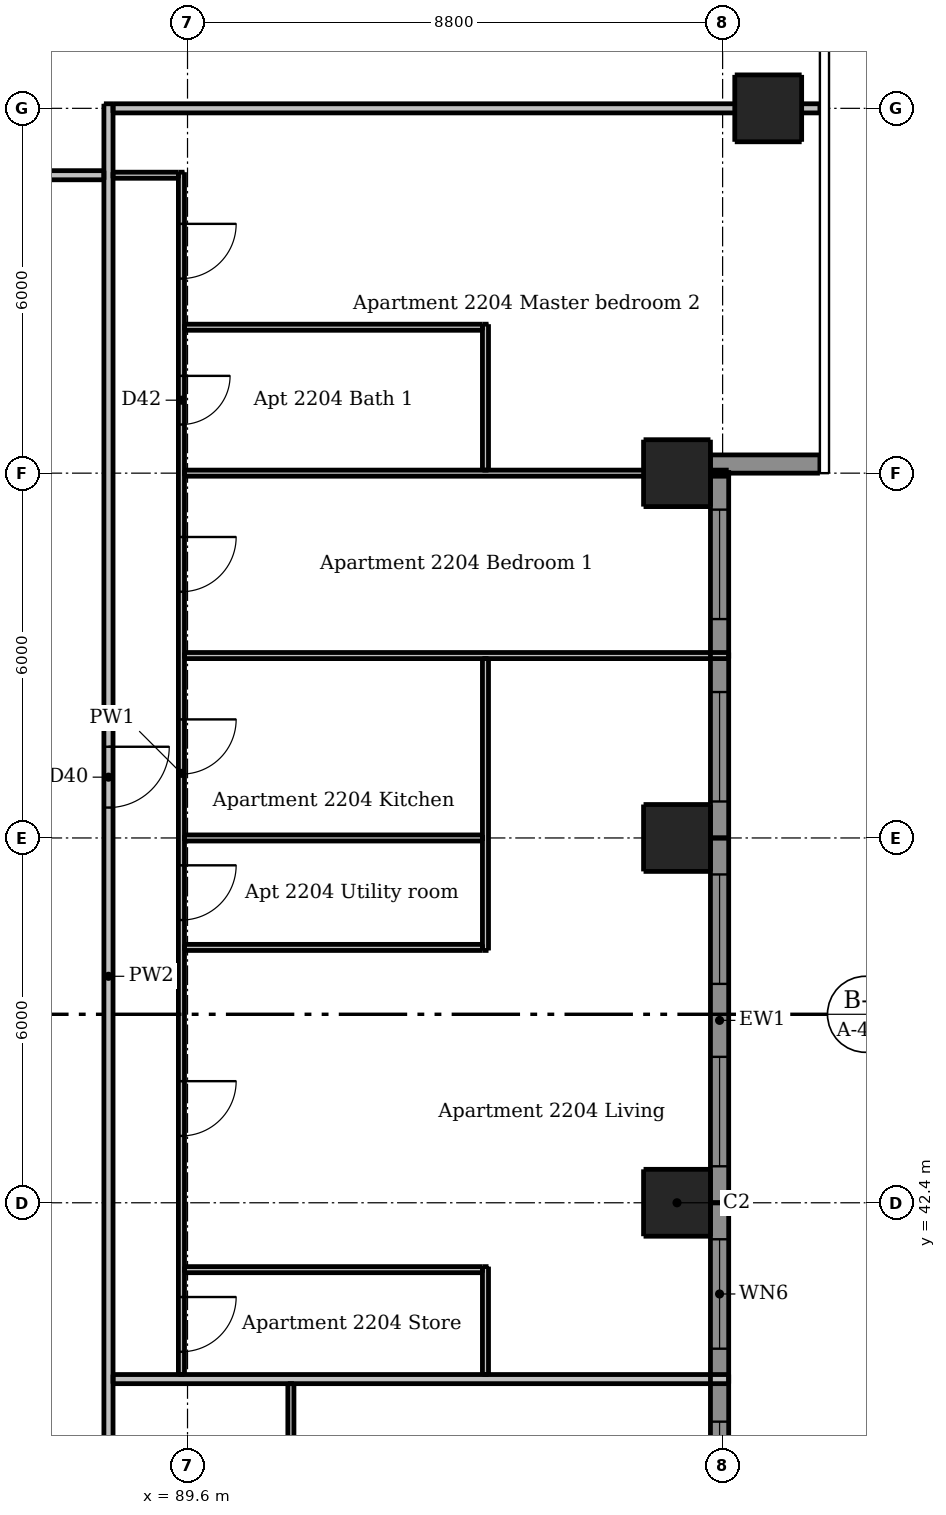
"""IFC4 building model, lengths in metres.
Left out: names, types, materials, properties, quantities, classifications, styles, units other than length and angle.
Written with IfcOpenShell. Run it as: python <this file> out.ifc"""

import sys

from ifc_helpers import new_model, si_unit, direction, frame, frame_2d, origin, origin_2d, place, context, subcontext, project, spatial, rectangle, extrude, element, fill, save


model = new_model("IFC4")
c1 = context("Model", 3, precision=1e-05, world=origin(), true_north=direction((0.0, 1.0)))
c2 = subcontext(c1, "Body", "Model", "MODEL_VIEW")
j1 = project(units=[si_unit("LENGTHUNIT", "METRE"), si_unit("PLANEANGLEUNIT", "RADIAN")], contexts=[c1])
p1 = place(None, origin())
s1 = spatial("IfcSite", under=j1, at=p1, CompositionType="ELEMENT")
p2 = place(p1, origin())
s2 = spatial("IfcBuilding", under=s1, at=p2, CompositionType="ELEMENT")
p3 = place(p2, frame((0.0, 0.0, 85.3)))
s3 = spatial("IfcBuildingStorey", under=s2, at=p3, CompositionType="ELEMENT", Elevation=85.3)
for number, where, z_axis, x_axis in (
    (1, (97.65, 42.4, 0.0), (0.0, 0.0, 1.0), (1.0, 0.0, 0.0)),
    (2, (97.65, 48.4, 0.0), (0.0, 0.0, 1.0), (1.0, 0.0, 0.0)),
    (3, (97.65, 54.4, 0.0), (0.0, 0.0, 1.0), (1.0, 0.0, 0.0)),
    (4, (99.15, 60.4, 0.0), (0.0, 0.0, 1.0), (1.0, 0.0, 0.0)),
):
    element("IfcColumn", number, at=place(p3, frame(where, z_axis=z_axis, x_axis=x_axis)), inside=s3, PredefinedType="COLUMN", context=c2, shape_type="SweptSolid", body=[
        extrude(rectangle(XDim=1.1, YDim=1.1, at=origin_2d()), origin(), (0.0, 0.0, 1.0), 3.05),
    ])
p4 = place(p3, frame((98.2, 54.55, 0.0), z_axis=(0.0, 0.0, 1.0), x_axis=(1.0, 0.0, 0.0)))
e5 = element("IfcWall", 5, at=p4, inside=s3, PredefinedType="SOLIDWALL", context=c2, shape_type="SweptSolid", body=[
    extrude(rectangle(XDim=1.8, YDim=0.3, at=frame_2d((0.9, 0.0))), origin(), (0.0, 0.0, 1.0), 3.05),
])
p5 = place(p3, frame((98.35, 36.7, 0.0), z_axis=(0.0, 0.0, 1.0), x_axis=(0.0, 1.0, 0.0)))
e6 = element("IfcWall", 6, at=p5, inside=s3, PredefinedType="SOLIDWALL", context=c2, shape_type="SweptSolid", body=[
    extrude(rectangle(XDim=5.7, YDim=0.3, at=frame_2d((2.85, 0.0))), origin(), (0.0, 0.0, 1.0), 3.05),
])
p6 = place(p5, frame((0.3, 0.0, 0.15)))
e7 = element("IfcOpeningElement", 7, at=p6, cuts=e6, PredefinedType="OPENING", context=c2, shape_type="SweptSolid", body=[
    extrude(rectangle(XDim=1.8, YDim=2.1, at=frame_2d((0.9, 1.05))), frame((0.0, 0.16, 0.0), z_axis=(0.0, -1.0, 0.0), x_axis=(1.0, 0.0, 0.0)), (0.0, 0.0, 1.0), 0.32),
])
p7 = place(p5, frame((3.3, 0.0, 0.15)))
e8 = element("IfcOpeningElement", 8, at=p7, cuts=e6, PredefinedType="OPENING", context=c2, shape_type="SweptSolid", body=[
    extrude(rectangle(XDim=1.8, YDim=2.1, at=frame_2d((0.9, 1.05))), frame((0.0, 0.16, 0.0), z_axis=(0.0, -1.0, 0.0), x_axis=(1.0, 0.0, 0.0)), (0.0, 0.0, 1.0), 0.32),
])
p8 = place(p3, frame((98.35, 42.4, 0.0), z_axis=(0.0, 0.0, 1.0), x_axis=(0.0, 1.0, 0.0)))
e9 = element("IfcWall", 9, at=p8, inside=s3, PredefinedType="SOLIDWALL", context=c2, shape_type="SweptSolid", body=[
    extrude(rectangle(XDim=6.0, YDim=0.3, at=frame_2d((3.0, 0.0))), origin(), (0.0, 0.0, 1.0), 3.05),
])
p9 = place(p8, frame((0.6, 0.0, 0.15)))
e10 = element("IfcOpeningElement", 10, at=p9, cuts=e9, PredefinedType="OPENING", context=c2, shape_type="SweptSolid", body=[
    extrude(rectangle(XDim=1.8, YDim=2.1, at=frame_2d((0.9, 1.05))), frame((0.0, 0.16, 0.0), z_axis=(0.0, -1.0, 0.0), x_axis=(1.0, 0.0, 0.0)), (0.0, 0.0, 1.0), 0.32),
])
p10 = place(p8, frame((3.6, 0.0, 0.15)))
e11 = element("IfcOpeningElement", 11, at=p10, cuts=e9, PredefinedType="OPENING", context=c2, shape_type="SweptSolid", body=[
    extrude(rectangle(XDim=1.8, YDim=2.1, at=frame_2d((0.9, 1.05))), frame((0.0, 0.16, 0.0), z_axis=(0.0, -1.0, 0.0), x_axis=(1.0, 0.0, 0.0)), (0.0, 0.0, 1.0), 0.32),
])
p11 = place(p3, frame((98.35, 48.4, 0.0), z_axis=(0.0, 0.0, 1.0), x_axis=(0.0, 1.0, 0.0)))
e12 = element("IfcWall", 12, at=p11, inside=s3, PredefinedType="SOLIDWALL", context=c2, shape_type="SweptSolid", body=[
    extrude(rectangle(XDim=6.0, YDim=0.3, at=frame_2d((3.0, 0.0))), origin(), (0.0, 0.0, 1.0), 3.05),
])
p12 = place(p11, frame((0.6, 0.0, 0.15)))
e13 = element("IfcOpeningElement", 13, at=p12, cuts=e12, PredefinedType="OPENING", context=c2, shape_type="SweptSolid", body=[
    extrude(rectangle(XDim=1.8, YDim=2.1, at=frame_2d((0.9, 1.05))), frame((0.0, 0.16, 0.0), z_axis=(0.0, -1.0, 0.0), x_axis=(1.0, 0.0, 0.0)), (0.0, 0.0, 1.0), 0.32),
])
p13 = place(p11, frame((3.6, 0.0, 0.15)))
e14 = element("IfcOpeningElement", 14, at=p13, cuts=e12, PredefinedType="OPENING", context=c2, shape_type="SweptSolid", body=[
    extrude(rectangle(XDim=1.8, YDim=2.1, at=frame_2d((0.9, 1.05))), frame((0.0, 0.16, 0.0), z_axis=(0.0, -1.0, 0.0), x_axis=(1.0, 0.0, 0.0)), (0.0, 0.0, 1.0), 0.32),
])
p14 = place(p3, frame((89.5, 59.35, 0.0), z_axis=(0.0, 0.0, 1.0), x_axis=(0.0, -1.0, 0.0)))
e15 = element("IfcWall", 15, at=p14, inside=s3, PredefinedType="PARTITIONING", context=c2, shape_type="SweptSolid", body=[
    extrude(rectangle(XDim=19.775, YDim=0.1, at=frame_2d((9.888, 0.0))), origin(), (0.0, 0.0, 1.0), 2.51),
])
p15 = place(p14, frame((14.95, 0.0, 0.0)))
e16 = element("IfcOpeningElement", 16, at=p15, cuts=e15, PredefinedType="OPENING", context=c2, shape_type="SweptSolid", body=[
    extrude(rectangle(XDim=0.9, YDim=2.1, at=frame_2d((0.45, 1.05))), frame((0.0, 0.06, 0.0), z_axis=(0.0, -1.0, 0.0), x_axis=(1.0, 0.0, 0.0)), (0.0, 0.0, 1.0), 0.12),
])
p16 = place(p14, frame((9.0, 0.0, 0.0)))
e17 = element("IfcOpeningElement", 17, at=p16, cuts=e15, PredefinedType="OPENING", context=c2, shape_type="SweptSolid", body=[
    extrude(rectangle(XDim=0.9, YDim=2.1, at=frame_2d((0.45, 1.05))), frame((0.0, 0.06, 0.0), z_axis=(0.0, -1.0, 0.0), x_axis=(1.0, 0.0, 0.0)), (0.0, 0.0, 1.0), 0.12),
])
p17 = place(p14, frame((11.4, 0.0, 0.0)))
e18 = element("IfcOpeningElement", 18, at=p17, cuts=e15, PredefinedType="OPENING", context=c2, shape_type="SweptSolid", body=[
    extrude(rectangle(XDim=0.9, YDim=2.1, at=frame_2d((0.45, 1.05))), frame((0.0, 0.06, 0.0), z_axis=(0.0, -1.0, 0.0), x_axis=(1.0, 0.0, 0.0)), (0.0, 0.0, 1.0), 0.12),
])
p18 = place(p14, frame((18.5, 0.0, 0.0)))
e19 = element("IfcOpeningElement", 19, at=p18, cuts=e15, PredefinedType="OPENING", context=c2, shape_type="SweptSolid", body=[
    extrude(rectangle(XDim=0.9, YDim=2.1, at=frame_2d((0.45, 1.05))), frame((0.0, 0.06, 0.0), z_axis=(0.0, -1.0, 0.0), x_axis=(1.0, 0.0, 0.0)), (0.0, 0.0, 1.0), 0.12),
])
p19 = place(p14, frame((6.0, 0.0, 0.0)))
e20 = element("IfcOpeningElement", 20, at=p19, cuts=e15, PredefinedType="OPENING", context=c2, shape_type="SweptSolid", body=[
    extrude(rectangle(XDim=0.9, YDim=2.1, at=frame_2d((0.45, 1.05))), frame((0.0, 0.06, 0.0), z_axis=(0.0, -1.0, 0.0), x_axis=(1.0, 0.0, 0.0)), (0.0, 0.0, 1.0), 0.12),
])
p20 = place(p14, frame((0.85, 0.0, 0.0)))
e21 = element("IfcOpeningElement", 21, at=p20, cuts=e15, PredefinedType="OPENING", context=c2, shape_type="SweptSolid", body=[
    extrude(rectangle(XDim=0.9, YDim=2.1, at=frame_2d((0.45, 1.05))), frame((0.0, 0.06, 0.0), z_axis=(0.0, -1.0, 0.0), x_axis=(1.0, 0.0, 0.0)), (0.0, 0.0, 1.0), 0.12),
])
p21 = place(p14, frame((3.35, 0.0, 0.0)))
e22 = element("IfcOpeningElement", 22, at=p21, cuts=e15, PredefinedType="OPENING", context=c2, shape_type="SweptSolid", body=[
    extrude(rectangle(XDim=0.8, YDim=2.1, at=frame_2d((0.4, 1.05))), frame((0.0, 0.06, 0.0), z_axis=(0.0, -1.0, 0.0), x_axis=(1.0, 0.0, 0.0)), (0.0, 0.0, 1.0), 0.12),
])
p22 = place(p3, frame((91.3, 33.45, 0.0), z_axis=(0.0, 0.0, 1.0), x_axis=(0.0, 1.0, 0.0)))
e23 = element("IfcWall", 23, at=p22, inside=s3, PredefinedType="PARTITIONING", context=c2, shape_type="SweptSolid", body=[
    extrude(rectangle(XDim=5.975, YDim=0.1, at=frame_2d((2.988, 0.0))), origin(), (0.0, 0.0, 1.0), 3.05),
])
p23 = place(p22, frame((3.8, 0.0, 0.0)))
e24 = element("IfcOpeningElement", 24, at=p23, cuts=e23, PredefinedType="OPENING", context=c2, shape_type="SweptSolid", body=[
    extrude(rectangle(XDim=0.8, YDim=2.1, at=frame_2d((0.4, 1.05))), frame((0.0, 0.06, 0.0), z_axis=(0.0, -1.0, 0.0), x_axis=(1.0, 0.0, 0.0)), (0.0, 0.0, 1.0), 0.12),
])
p24 = place(p3, frame((94.5, 39.575, 0.0), z_axis=(0.0, 0.0, 1.0), x_axis=(0.0, 1.0, 0.0)))
e25 = element("IfcWall", 25, at=p24, inside=s3, PredefinedType="PARTITIONING", context=c2, shape_type="SweptSolid", body=[
    extrude(rectangle(XDim=1.775, YDim=0.1, at=frame_2d((0.888, 0.0))), origin(), (0.0, 0.0, 1.0), 3.05),
])
p25 = place(p3, frame((94.5, 46.55, 0.0), z_axis=(0.0, 0.0, 1.0), x_axis=(0.0, 1.0, 0.0)))
e26 = element("IfcWall", 26, at=p25, inside=s3, PredefinedType="PARTITIONING", context=c2, shape_type="SweptSolid", body=[
    extrude(rectangle(XDim=4.8, YDim=0.1, at=frame_2d((2.4, 0.0))), origin(), (0.0, 0.0, 1.0), 3.05),
])
p26 = place(p3, frame((94.5, 54.45, 0.0), z_axis=(0.0, 0.0, 1.0), x_axis=(0.0, 1.0, 0.0)))
e27 = element("IfcWall", 27, at=p26, inside=s3, PredefinedType="PARTITIONING", context=c2, shape_type="SweptSolid", body=[
    extrude(rectangle(XDim=2.4, YDim=0.1, at=frame_2d((1.2, 0.0))), origin(), (0.0, 0.0, 1.0), 3.05),
])
p27 = place(p3, frame((88.375, 59.3, 0.0), z_axis=(0.0, 0.0, 1.0), x_axis=(1.0, 0.0, 0.0)))
e28 = element("IfcWall", 28, at=p27, inside=s3, PredefinedType="PARTITIONING", context=c2, shape_type="SweptSolid", body=[
    extrude(rectangle(XDim=1.075, YDim=0.1, at=frame_2d((0.538, 0.0))), origin(), (0.0, 0.0, 1.0), 3.05),
])
p28 = place(p3, frame((89.55, 56.8, 0.0), z_axis=(0.0, 0.0, 1.0), x_axis=(1.0, 0.0, 0.0)))
e29 = element("IfcWall", 29, at=p28, inside=s3, PredefinedType="PARTITIONING", context=c2, shape_type="SweptSolid", body=[
    extrude(rectangle(XDim=4.9, YDim=0.1, at=frame_2d((2.45, 0.0))), origin(), (0.0, 0.0, 1.0), 3.05),
])
p29 = place(p3, frame((89.55, 54.4, 0.0), z_axis=(0.0, 0.0, 1.0), x_axis=(1.0, 0.0, 0.0)))
e30 = element("IfcWall", 30, at=p29, inside=s3, PredefinedType="PARTITIONING", context=c2, shape_type="SweptSolid", body=[
    extrude(rectangle(XDim=8.95, YDim=0.1, at=frame_2d((4.475, 0.0))), origin(), (0.0, 0.0, 1.0), 2.516),
])
p30 = place(p3, frame((89.55, 51.4, 0.0), z_axis=(0.0, 0.0, 1.0), x_axis=(1.0, 0.0, 0.0)))
e31 = element("IfcWall", 31, at=p30, inside=s3, PredefinedType="PARTITIONING", context=c2, shape_type="SweptSolid", body=[
    extrude(rectangle(XDim=8.95, YDim=0.1, at=frame_2d((4.475, 0.0))), origin(), (0.0, 0.0, 1.0), 3.05),
])
p31 = place(p3, frame((89.55, 48.4, 0.0), z_axis=(0.0, 0.0, 1.0), x_axis=(1.0, 0.0, 0.0)))
e32 = element("IfcWall", 32, at=p31, inside=s3, PredefinedType="PARTITIONING", context=c2, shape_type="SweptSolid", body=[
    extrude(rectangle(XDim=4.9, YDim=0.1, at=frame_2d((2.45, 0.0))), origin(), (0.0, 0.0, 1.0), 2.516),
])
for number, where, z_axis, x_axis in (
    (33, (89.55, 46.6, 0.0), (0.0, 0.0, 1.0), (1.0, 0.0, 0.0)),
    (34, (89.55, 41.3, 0.0), (0.0, 0.0, 1.0), (1.0, 0.0, 0.0)),
):
    element("IfcWall", number, at=place(p3, frame(where, z_axis=z_axis, x_axis=x_axis)), inside=s3, PredefinedType="PARTITIONING", context=c2, shape_type="SweptSolid", body=[
        extrude(rectangle(XDim=4.9, YDim=0.1, at=frame_2d((2.45, 0.0))), origin(), (0.0, 0.0, 1.0), 3.05),
    ])
p32 = place(p3, frame((88.3, 60.475, 0.0), z_axis=(0.0, 0.0, 1.0), x_axis=(0.0, -1.0, 0.0)))
e35 = element("IfcWall", 35, at=p32, inside=s3, PredefinedType="PARTITIONING", context=c2, shape_type="SweptSolid", body=[
    extrude(rectangle(XDim=28.7, YDim=0.15, at=frame_2d((14.35, 0.0))), origin(), (0.0, 0.0, 1.0), 3.05),
])
p33 = place(p32, frame((27.425, 0.0, 0.0)))
e36 = element("IfcOpeningElement", 36, at=p33, cuts=e35, PredefinedType="OPENING", context=c2, shape_type="SweptSolid", body=[
    extrude(rectangle(XDim=1.0, YDim=2.1, at=frame_2d((0.5, 1.05))), frame((0.0, 0.085, 0.0), z_axis=(0.0, -1.0, 0.0), x_axis=(1.0, 0.0, 0.0)), (0.0, 0.0, 1.0), 0.17),
])
p34 = place(p32, frame((10.575, 0.0, 0.0)))
e37 = element("IfcOpeningElement", 37, at=p34, cuts=e35, PredefinedType="OPENING", context=c2, shape_type="SweptSolid", body=[
    extrude(rectangle(XDim=1.0, YDim=2.1, at=frame_2d((0.5, 1.05))), frame((0.0, 0.085, 0.0), z_axis=(0.0, -1.0, 0.0), x_axis=(1.0, 0.0, 0.0)), (0.0, 0.0, 1.0), 0.17),
])
p35 = place(p3, frame((88.375, 60.4, 0.0), z_axis=(0.0, 0.0, 1.0), x_axis=(1.0, 0.0, 0.0)))
e38 = element("IfcWall", 38, at=p35, inside=s3, PredefinedType="PARTITIONING", context=c2, shape_type="SweptSolid", body=[
    extrude(rectangle(XDim=11.625, YDim=0.15, at=frame_2d((5.812, 0.0))), origin(), (0.0, 0.0, 1.0), 2.516),
])
p36 = place(p3, frame((59.675, 59.3, 0.0), z_axis=(0.0, 0.0, 1.0), x_axis=(1.0, 0.0, 0.0)))
e39 = element("IfcWall", 39, at=p36, inside=s3, PredefinedType="PARTITIONING", context=c2, shape_type="SweptSolid", body=[
    extrude(rectangle(XDim=28.55, YDim=0.15, at=frame_2d((14.275, 0.0))), origin(), (0.0, 0.0, 1.0), 3.05),
])
p37 = place(p36, frame((8.975, 0.0, 0.0)))
e40 = element("IfcOpeningElement", 40, at=p37, cuts=e39, PredefinedType="OPENING", context=c2, shape_type="SweptSolid", body=[
    extrude(rectangle(XDim=1.0, YDim=2.1, at=frame_2d((0.5, 1.05))), frame((0.0, 0.085, 0.0), z_axis=(0.0, -1.0, 0.0), x_axis=(1.0, 0.0, 0.0)), (0.0, 0.0, 1.0), 0.17),
])
p38 = place(p36, frame((25.775, 0.0, 0.0)))
e41 = element("IfcOpeningElement", 41, at=p38, cuts=e39, PredefinedType="OPENING", context=c2, shape_type="SweptSolid", body=[
    extrude(rectangle(XDim=1.0, YDim=2.1, at=frame_2d((0.5, 1.05))), frame((0.0, 0.085, 0.0), z_axis=(0.0, -1.0, 0.0), x_axis=(1.0, 0.0, 0.0)), (0.0, 0.0, 1.0), 0.17),
])
p39 = place(p3, frame((88.375, 39.5, 0.0), z_axis=(0.0, 0.0, 1.0), x_axis=(1.0, 0.0, 0.0)))
e42 = element("IfcWall", 42, at=p39, inside=s3, PredefinedType="PARTITIONING", context=c2, shape_type="SweptSolid", body=[
    extrude(rectangle(XDim=10.125, YDim=0.15, at=frame_2d((5.062, 0.0))), origin(), (0.0, 0.0, 1.0), 3.05),
])
p40 = place(p6, origin())
e43 = element("IfcWindow", 43, at=p40, inside=s3, PartitioningType="DOUBLE_PANEL_VERTICAL", PredefinedType="WINDOW", context=c2, shape_type="SweptSolid", body=[
    extrude(rectangle(XDim=1.8, YDim=2.1, at=frame_2d((0.9, 1.05))), frame((0.0, 0.03, 0.0), z_axis=(0.0, -1.0, 0.0), x_axis=(1.0, 0.0, 0.0)), (0.0, 0.0, 1.0), 0.06),
])
fill(e7, e43)
p41 = place(p7, origin())
e44 = element("IfcWindow", 44, at=p41, inside=s3, PartitioningType="DOUBLE_PANEL_VERTICAL", PredefinedType="WINDOW", context=c2, shape_type="SweptSolid", body=[
    extrude(rectangle(XDim=1.8, YDim=2.1, at=frame_2d((0.9, 1.05))), frame((0.0, 0.03, 0.0), z_axis=(0.0, -1.0, 0.0), x_axis=(1.0, 0.0, 0.0)), (0.0, 0.0, 1.0), 0.06),
])
fill(e8, e44)
p42 = place(p9, origin())
e45 = element("IfcWindow", 45, at=p42, inside=s3, PartitioningType="DOUBLE_PANEL_VERTICAL", PredefinedType="WINDOW", context=c2, shape_type="SweptSolid", body=[
    extrude(rectangle(XDim=1.8, YDim=2.1, at=frame_2d((0.9, 1.05))), frame((0.0, 0.03, 0.0), z_axis=(0.0, -1.0, 0.0), x_axis=(1.0, 0.0, 0.0)), (0.0, 0.0, 1.0), 0.06),
])
fill(e10, e45)
p43 = place(p10, origin())
e46 = element("IfcWindow", 46, at=p43, inside=s3, PartitioningType="DOUBLE_PANEL_VERTICAL", PredefinedType="WINDOW", context=c2, shape_type="SweptSolid", body=[
    extrude(rectangle(XDim=1.8, YDim=2.1, at=frame_2d((0.9, 1.05))), frame((0.0, 0.03, 0.0), z_axis=(0.0, -1.0, 0.0), x_axis=(1.0, 0.0, 0.0)), (0.0, 0.0, 1.0), 0.06),
])
fill(e11, e46)
p44 = place(p12, origin())
e47 = element("IfcWindow", 47, at=p44, inside=s3, PartitioningType="DOUBLE_PANEL_VERTICAL", PredefinedType="WINDOW", context=c2, shape_type="SweptSolid", body=[
    extrude(rectangle(XDim=1.8, YDim=2.1, at=frame_2d((0.9, 1.05))), frame((0.0, 0.03, 0.0), z_axis=(0.0, -1.0, 0.0), x_axis=(1.0, 0.0, 0.0)), (0.0, 0.0, 1.0), 0.06),
])
fill(e13, e47)
p45 = place(p13, origin())
e48 = element("IfcWindow", 48, at=p45, inside=s3, PartitioningType="DOUBLE_PANEL_VERTICAL", PredefinedType="WINDOW", context=c2, shape_type="SweptSolid", body=[
    extrude(rectangle(XDim=1.8, YDim=2.1, at=frame_2d((0.9, 1.05))), frame((0.0, 0.03, 0.0), z_axis=(0.0, -1.0, 0.0), x_axis=(1.0, 0.0, 0.0)), (0.0, 0.0, 1.0), 0.06),
])
fill(e14, e48)
p46 = place(p34, origin())
e49 = element("IfcDoor", 49, at=p46, inside=s3, OperationType="SINGLE_SWING_LEFT", PredefinedType="DOOR", context=c2, shape_type="SweptSolid", body=[
    extrude(rectangle(XDim=1.0, YDim=2.1, at=frame_2d((0.5, 1.05))), frame((0.0, 0.025, 0.0), z_axis=(0.0, -1.0, 0.0), x_axis=(1.0, 0.0, 0.0)), (0.0, 0.0, 1.0), 0.05),
])
fill(e37, e49)
p47 = place(p15, origin())
e50 = element("IfcDoor", 50, at=p47, inside=s3, OperationType="SINGLE_SWING_LEFT", PredefinedType="DOOR", context=c2, shape_type="SweptSolid", body=[
    extrude(rectangle(XDim=0.9, YDim=2.1, at=frame_2d((0.45, 1.05))), frame((0.0, 0.025, 0.0), z_axis=(0.0, -1.0, 0.0), x_axis=(1.0, 0.0, 0.0)), (0.0, 0.0, 1.0), 0.05),
])
fill(e16, e50)
p48 = place(p16, origin())
e51 = element("IfcDoor", 51, at=p48, inside=s3, OperationType="SINGLE_SWING_LEFT", PredefinedType="DOOR", context=c2, shape_type="SweptSolid", body=[
    extrude(rectangle(XDim=0.9, YDim=2.1, at=frame_2d((0.45, 1.05))), frame((0.0, 0.025, 0.0), z_axis=(0.0, -1.0, 0.0), x_axis=(1.0, 0.0, 0.0)), (0.0, 0.0, 1.0), 0.05),
])
fill(e17, e51)
p49 = place(p17, origin())
e52 = element("IfcDoor", 52, at=p49, inside=s3, OperationType="SINGLE_SWING_LEFT", PredefinedType="DOOR", context=c2, shape_type="SweptSolid", body=[
    extrude(rectangle(XDim=0.9, YDim=2.1, at=frame_2d((0.45, 1.05))), frame((0.0, 0.025, 0.0), z_axis=(0.0, -1.0, 0.0), x_axis=(1.0, 0.0, 0.0)), (0.0, 0.0, 1.0), 0.05),
])
fill(e18, e52)
p50 = place(p18, origin())
e53 = element("IfcDoor", 53, at=p50, inside=s3, OperationType="SINGLE_SWING_LEFT", PredefinedType="DOOR", context=c2, shape_type="SweptSolid", body=[
    extrude(rectangle(XDim=0.9, YDim=2.1, at=frame_2d((0.45, 1.05))), frame((0.0, 0.025, 0.0), z_axis=(0.0, -1.0, 0.0), x_axis=(1.0, 0.0, 0.0)), (0.0, 0.0, 1.0), 0.05),
])
fill(e19, e53)
p51 = place(p19, origin())
e54 = element("IfcDoor", 54, at=p51, inside=s3, OperationType="SINGLE_SWING_LEFT", PredefinedType="DOOR", context=c2, shape_type="SweptSolid", body=[
    extrude(rectangle(XDim=0.9, YDim=2.1, at=frame_2d((0.45, 1.05))), frame((0.0, 0.025, 0.0), z_axis=(0.0, -1.0, 0.0), x_axis=(1.0, 0.0, 0.0)), (0.0, 0.0, 1.0), 0.05),
])
fill(e20, e54)
p52 = place(p20, origin())
e55 = element("IfcDoor", 55, at=p52, inside=s3, OperationType="SINGLE_SWING_LEFT", PredefinedType="DOOR", context=c2, shape_type="SweptSolid", body=[
    extrude(rectangle(XDim=0.9, YDim=2.1, at=frame_2d((0.45, 1.05))), frame((0.0, 0.025, 0.0), z_axis=(0.0, -1.0, 0.0), x_axis=(1.0, 0.0, 0.0)), (0.0, 0.0, 1.0), 0.05),
])
fill(e21, e55)
p53 = place(p21, origin())
e56 = element("IfcDoor", 56, at=p53, inside=s3, OperationType="SINGLE_SWING_LEFT", PredefinedType="DOOR", context=c2, shape_type="SweptSolid", body=[
    extrude(rectangle(XDim=0.8, YDim=2.1, at=frame_2d((0.4, 1.05))), frame((0.0, 0.025, 0.0), z_axis=(0.0, -1.0, 0.0), x_axis=(1.0, 0.0, 0.0)), (0.0, 0.0, 1.0), 0.05),
])
fill(e22, e56)
save(model, sys.argv[1])
